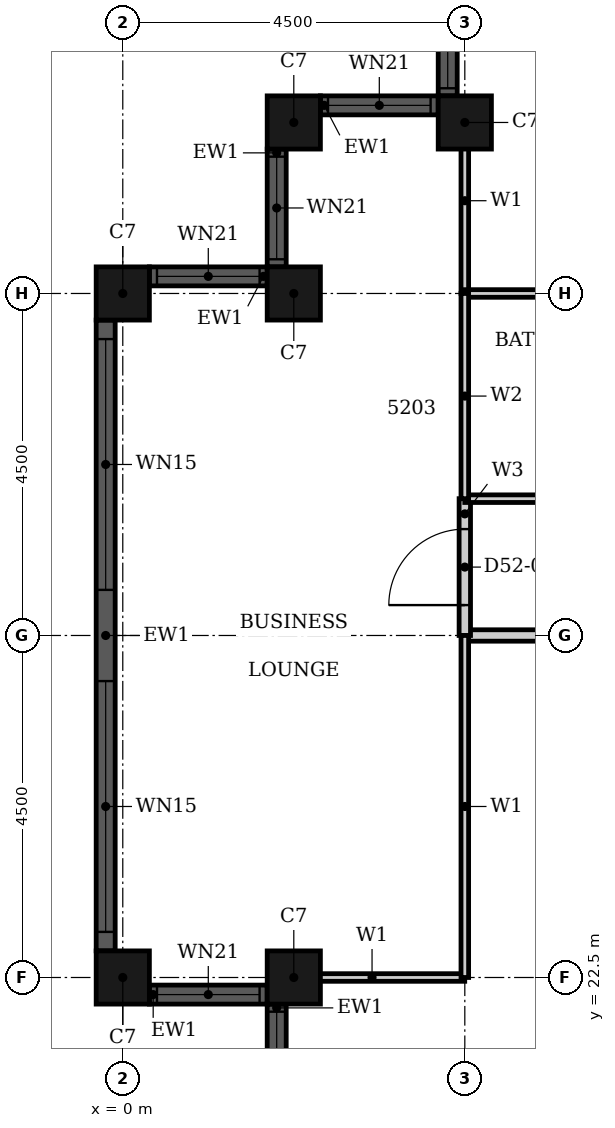
"""IFC4 building model, lengths in metres.
Left out: names, types, materials, properties, quantities, classifications, styles, units other than length and angle.
Written with IfcOpenShell. Run it as: python <this file> out.ifc"""

import sys

from ifc_helpers import new_model, si_unit, direction, frame, frame_2d, origin, origin_2d, place, context, subcontext, project, spatial, rectangle, hollow_rectangle, extrude, element, fill, save


model = new_model("IFC4")
c1 = context("Model", 3, precision=1e-05, world=origin(), true_north=direction((0.0, 1.0)))
c2 = subcontext(c1, "Body", "Model", "MODEL_VIEW")
j1 = project(units=[si_unit("LENGTHUNIT", "METRE"), si_unit("PLANEANGLEUNIT", "RADIAN")], contexts=[c1])
p1 = place(None, origin())
s1 = spatial("IfcSite", under=j1, at=p1, CompositionType="ELEMENT")
p2 = place(p1, origin())
s2 = spatial("IfcBuilding", under=s1, at=p2, CompositionType="ELEMENT")
p3 = place(p2, frame((0.0, 0.0, 207.2)))
s3 = spatial("IfcBuildingStorey", under=s2, at=p3, CompositionType="ELEMENT", Elevation=207.2)
for number, where, z_axis, x_axis in (
    (1, (4.5, 33.75, 0.0), (0.0, 0.0, 1.0), (1.0, 0.0, 0.0)),
    (2, (2.25, 33.75, 0.0), (0.0, 0.0, 1.0), (1.0, 0.0, 0.0)),
    (3, (2.25, 31.5, 0.0), (0.0, 0.0, 1.0), (1.0, 0.0, 0.0)),
    (4, (0.0, 31.5, 0.0), (0.0, 0.0, 1.0), (1.0, 0.0, 0.0)),
    (5, (0.0, 22.5, 0.0), (0.0, 0.0, 1.0), (1.0, 0.0, 0.0)),
    (6, (2.25, 22.5, 0.0), (0.0, 0.0, 1.0), (1.0, 0.0, 0.0)),
):
    element("IfcColumn", number, at=place(p3, frame(where, z_axis=z_axis, x_axis=x_axis)), inside=s3, PredefinedType="COLUMN", context=c2, shape_type="SweptSolid", body=[
        extrude(hollow_rectangle(XDim=0.7, YDim=0.7, WallThickness=0.022, at=origin_2d()), origin(), (0.0, 0.0, 1.0), 3.7),
    ])
p4 = place(p3, frame((4.275, 35.65, 0.0), z_axis=(0.0, 0.0, 1.0), x_axis=(0.0, -1.0, 0.0)))
e7 = element("IfcWall", 7, at=p4, inside=s3, PredefinedType="SOLIDWALL", context=c2, shape_type="SweptSolid", body=[
    extrude(rectangle(XDim=1.55, YDim=0.25, at=frame_2d((0.775, 0.0))), origin(), (0.0, 0.0, 1.0), 3.7),
])
p5 = place(p4, frame((0.1, 0.0, 0.9)))
e8 = element("IfcOpeningElement", 8, at=p5, cuts=e7, PredefinedType="OPENING", context=c2, shape_type="SweptSolid", body=[
    extrude(rectangle(XDim=1.35, YDim=1.85, at=frame_2d((0.675, 0.925))), frame((0.0, 0.135, 0.0), z_axis=(0.0, -1.0, 0.0), x_axis=(1.0, 0.0, 0.0)), (0.0, 0.0, 1.0), 0.27),
])
p6 = place(p3, frame((4.15, 33.975, 0.0), z_axis=(0.0, 0.0, 1.0), x_axis=(-1.0, 0.0, 0.0)))
e9 = element("IfcWall", 9, at=p6, inside=s3, PredefinedType="SOLIDWALL", context=c2, shape_type="SweptSolid", body=[
    extrude(rectangle(XDim=1.55, YDim=0.25, at=frame_2d((0.775, 0.0))), origin(), (0.0, 0.0, 1.0), 3.7),
])
p7 = place(p6, frame((0.1, 0.0, 0.9)))
e10 = element("IfcOpeningElement", 10, at=p7, cuts=e9, PredefinedType="OPENING", context=c2, shape_type="SweptSolid", body=[
    extrude(rectangle(XDim=1.35, YDim=1.85, at=frame_2d((0.675, 0.925))), frame((0.0, 0.135, 0.0), z_axis=(0.0, -1.0, 0.0), x_axis=(1.0, 0.0, 0.0)), (0.0, 0.0, 1.0), 0.27),
])
p8 = place(p3, frame((2.025, 33.4, 0.0), z_axis=(0.0, 0.0, 1.0), x_axis=(0.0, -1.0, 0.0)))
e11 = element("IfcWall", 11, at=p8, inside=s3, PredefinedType="SOLIDWALL", context=c2, shape_type="SweptSolid", body=[
    extrude(rectangle(XDim=1.55, YDim=0.25, at=frame_2d((0.775, 0.0))), origin(), (0.0, 0.0, 1.0), 3.7),
])
p9 = place(p8, frame((0.1, 0.0, 0.9)))
e12 = element("IfcOpeningElement", 12, at=p9, cuts=e11, PredefinedType="OPENING", context=c2, shape_type="SweptSolid", body=[
    extrude(rectangle(XDim=1.35, YDim=1.85, at=frame_2d((0.675, 0.925))), frame((0.0, 0.135, 0.0), z_axis=(0.0, -1.0, 0.0), x_axis=(1.0, 0.0, 0.0)), (0.0, 0.0, 1.0), 0.27),
])
p10 = place(p3, frame((1.9, 31.725, 0.0), z_axis=(0.0, 0.0, 1.0), x_axis=(-1.0, 0.0, 0.0)))
e13 = element("IfcWall", 13, at=p10, inside=s3, PredefinedType="SOLIDWALL", context=c2, shape_type="SweptSolid", body=[
    extrude(rectangle(XDim=1.55, YDim=0.25, at=frame_2d((0.775, 0.0))), origin(), (0.0, 0.0, 1.0), 3.7),
])
p11 = place(p10, frame((0.1, 0.0, 0.9)))
e14 = element("IfcOpeningElement", 14, at=p11, cuts=e13, PredefinedType="OPENING", context=c2, shape_type="SweptSolid", body=[
    extrude(rectangle(XDim=1.35, YDim=1.85, at=frame_2d((0.675, 0.925))), frame((0.0, 0.135, 0.0), z_axis=(0.0, -1.0, 0.0), x_axis=(1.0, 0.0, 0.0)), (0.0, 0.0, 1.0), 0.27),
])
p12 = place(p3, frame((-0.225, 31.15, 0.0), z_axis=(0.0, 0.0, 1.0), x_axis=(0.0, -1.0, 0.0)))
e15 = element("IfcWall", 15, at=p12, inside=s3, PredefinedType="SOLIDWALL", context=c2, shape_type="SweptSolid", body=[
    extrude(rectangle(XDim=8.3, YDim=0.25, at=frame_2d((4.15, 0.0))), origin(), (0.0, 0.0, 1.0), 3.7),
])
p13 = place(p12, frame((0.25, 0.0, 0.45)))
e16 = element("IfcOpeningElement", 16, at=p13, cuts=e15, PredefinedType="OPENING", context=c2, shape_type="SweptSolid", body=[
    extrude(rectangle(XDim=3.3, YDim=2.3, at=frame_2d((1.65, 1.15))), frame((0.0, 0.135, 0.0), z_axis=(0.0, -1.0, 0.0), x_axis=(1.0, 0.0, 0.0)), (0.0, 0.0, 1.0), 0.27),
])
p14 = place(p12, frame((4.75, 0.0, 0.45)))
e17 = element("IfcOpeningElement", 17, at=p14, cuts=e15, PredefinedType="OPENING", context=c2, shape_type="SweptSolid", body=[
    extrude(rectangle(XDim=3.3, YDim=2.3, at=frame_2d((1.65, 1.15))), frame((0.0, 0.135, 0.0), z_axis=(0.0, -1.0, 0.0), x_axis=(1.0, 0.0, 0.0)), (0.0, 0.0, 1.0), 0.27),
])
p15 = place(p3, frame((0.35, 22.275, 0.0), z_axis=(0.0, 0.0, 1.0), x_axis=(1.0, 0.0, 0.0)))
e18 = element("IfcWall", 18, at=p15, inside=s3, PredefinedType="SOLIDWALL", context=c2, shape_type="SweptSolid", body=[
    extrude(rectangle(XDim=1.55, YDim=0.25, at=frame_2d((0.775, 0.0))), origin(), (0.0, 0.0, 1.0), 3.7),
])
p16 = place(p15, frame((0.1, 0.0, 0.9)))
e19 = element("IfcOpeningElement", 19, at=p16, cuts=e18, PredefinedType="OPENING", context=c2, shape_type="SweptSolid", body=[
    extrude(rectangle(XDim=1.35, YDim=1.85, at=frame_2d((0.675, 0.925))), frame((0.0, 0.135, 0.0), z_axis=(0.0, -1.0, 0.0), x_axis=(1.0, 0.0, 0.0)), (0.0, 0.0, 1.0), 0.27),
])
p17 = place(p3, frame((2.025, 22.15, 0.0), z_axis=(0.0, 0.0, 1.0), x_axis=(0.0, -1.0, 0.0)))
e20 = element("IfcWall", 20, at=p17, inside=s3, PredefinedType="SOLIDWALL", context=c2, shape_type="SweptSolid", body=[
    extrude(rectangle(XDim=1.55, YDim=0.25, at=frame_2d((0.775, 0.0))), origin(), (0.0, 0.0, 1.0), 3.7),
])
p18 = place(p17, frame((0.1, 0.0, 0.9)))
e21 = element("IfcOpeningElement", 21, at=p18, cuts=e20, PredefinedType="OPENING", context=c2, shape_type="SweptSolid", body=[
    extrude(rectangle(XDim=1.35, YDim=1.85, at=frame_2d((0.675, 0.925))), frame((0.0, 0.135, 0.0), z_axis=(0.0, -1.0, 0.0), x_axis=(1.0, 0.0, 0.0)), (0.0, 0.0, 1.0), 0.27),
])
p19 = place(p3, frame((4.5, 27.0, 0.0), z_axis=(0.0, 0.0, 1.0), x_axis=(1.0, 0.0, 0.0)))
e22 = element("IfcWall", 22, at=p19, inside=s3, PredefinedType="PARTITIONING", context=c2, shape_type="SweptSolid", body=[
    extrude(rectangle(XDim=13.5, YDim=0.15, at=frame_2d((6.75, 0.0))), origin(), (0.0, 0.0, 1.0), 2.68),
])
p20 = place(p19, frame((5.35, 0.0, 0.0)))
e23 = element("IfcOpeningElement", 23, at=p20, cuts=e22, PredefinedType="OPENING", context=c2, shape_type="SweptSolid", body=[
    extrude(rectangle(XDim=1.0, YDim=2.1, at=frame_2d((0.5, 1.05))), frame((0.0, 0.085, 0.0), z_axis=(0.0, -1.0, 0.0), x_axis=(1.0, 0.0, 0.0)), (0.0, 0.0, 1.0), 0.17),
])
p21 = place(p3, frame((4.5, 27.0, 0.0), z_axis=(0.0, 0.0, 1.0), x_axis=(0.0, 1.0, 0.0)))
e24 = element("IfcWall", 24, at=p21, inside=s3, PredefinedType="PARTITIONING", context=c2, shape_type="SweptSolid", body=[
    extrude(rectangle(XDim=1.8, YDim=0.15, at=frame_2d((0.9, 0.0))), origin(), (0.0, 0.0, 1.0), 3.4),
])
p22 = place(p21, frame((0.4, 0.0, 0.0)))
e25 = element("IfcOpeningElement", 25, at=p22, cuts=e24, PredefinedType="OPENING", context=c2, shape_type="SweptSolid", body=[
    extrude(rectangle(XDim=1.0, YDim=2.1, at=frame_2d((0.5, 1.05))), frame((0.0, 0.085, 0.0), z_axis=(0.0, -1.0, 0.0), x_axis=(1.0, 0.0, 0.0)), (0.0, 0.0, 1.0), 0.17),
])
p23 = place(p3, frame((2.06, 22.5, 0.0), z_axis=(0.0, 0.0, 1.0), x_axis=(1.0, 0.0, 0.0)))
e26 = element("IfcWall", 26, at=p23, inside=s3, PredefinedType="PARTITIONING", context=c2, shape_type="SweptSolid", body=[
    extrude(rectangle(XDim=2.439, YDim=0.1, at=frame_2d((1.219, 0.0))), origin(), (0.0, 0.0, 1.0), 2.68),
])
p24 = place(p3, frame((4.5, 31.501, 0.0), z_axis=(0.0, 0.0, 1.0), x_axis=(0.0, 1.0, 0.0)))
e27 = element("IfcWall", 27, at=p24, inside=s3, PredefinedType="PARTITIONING", context=c2, shape_type="SweptSolid", body=[
    extrude(rectangle(XDim=2.439, YDim=0.1, at=frame_2d((1.219, 0.0))), origin(), (0.0, 0.0, 1.0), 3.4),
])
p25 = place(p3, frame((4.5, 22.5, 0.0), z_axis=(0.0, 0.0, 1.0), x_axis=(0.0, 1.0, 0.0)))
e28 = element("IfcWall", 28, at=p25, inside=s3, PredefinedType="PARTITIONING", context=c2, shape_type="SweptSolid", body=[
    extrude(rectangle(XDim=4.5, YDim=0.1, at=frame_2d((2.25, 0.0))), origin(), (0.0, 0.0, 1.0), 3.4),
])
p26 = place(p3, frame((4.5, 28.8, 0.0), z_axis=(0.0, 0.0, 1.0), x_axis=(1.0, 0.0, 0.0)))
e29 = element("IfcWall", 29, at=p26, inside=s3, PredefinedType="PARTITIONING", context=c2, shape_type="SweptSolid", body=[
    extrude(rectangle(XDim=2.4, YDim=0.1, at=frame_2d((1.2, 0.0))), origin(), (0.0, 0.0, 1.0), 3.4),
])
p27 = place(p3, frame((4.5, 31.5, 0.0), z_axis=(0.0, 0.0, 1.0), x_axis=(1.0, 0.0, 0.0)))
e30 = element("IfcWall", 30, at=p27, inside=s3, PredefinedType="PARTITIONING", context=c2, shape_type="SweptSolid", body=[
    extrude(rectangle(XDim=2.4, YDim=0.1, at=frame_2d((1.2, 0.0))), origin(), (0.0, 0.0, 1.0), 2.68),
])
p28 = place(p3, frame((4.5, 28.8, 0.0), z_axis=(0.0, 0.0, 1.0), x_axis=(0.0, 1.0, 0.0)))
e31 = element("IfcWall", 31, at=p28, inside=s3, PredefinedType="PARTITIONING", context=c2, shape_type="SweptSolid", body=[
    extrude(rectangle(XDim=2.7, YDim=0.1, at=frame_2d((1.35, 0.0))), origin(), (0.0, 0.0, 1.0), 3.4),
])
p29 = place(p5, origin())
e32 = element("IfcWindow", 32, at=p29, inside=s3, PartitioningType="SINGLE_PANEL", PredefinedType="WINDOW", context=c2, shape_type="SweptSolid", body=[
    extrude(rectangle(XDim=1.35, YDim=1.85, at=frame_2d((0.675, 0.925))), frame((0.0, 0.03, 0.0), z_axis=(0.0, -1.0, 0.0), x_axis=(1.0, 0.0, 0.0)), (0.0, 0.0, 1.0), 0.06),
])
fill(e8, e32)
p30 = place(p7, origin())
e33 = element("IfcWindow", 33, at=p30, inside=s3, PartitioningType="SINGLE_PANEL", PredefinedType="WINDOW", context=c2, shape_type="SweptSolid", body=[
    extrude(rectangle(XDim=1.35, YDim=1.85, at=frame_2d((0.675, 0.925))), frame((0.0, 0.03, 0.0), z_axis=(0.0, -1.0, 0.0), x_axis=(1.0, 0.0, 0.0)), (0.0, 0.0, 1.0), 0.06),
])
fill(e10, e33)
p31 = place(p9, origin())
e34 = element("IfcWindow", 34, at=p31, inside=s3, PartitioningType="SINGLE_PANEL", PredefinedType="WINDOW", context=c2, shape_type="SweptSolid", body=[
    extrude(rectangle(XDim=1.35, YDim=1.85, at=frame_2d((0.675, 0.925))), frame((0.0, 0.03, 0.0), z_axis=(0.0, -1.0, 0.0), x_axis=(1.0, 0.0, 0.0)), (0.0, 0.0, 1.0), 0.06),
])
fill(e12, e34)
p32 = place(p11, origin())
e35 = element("IfcWindow", 35, at=p32, inside=s3, PartitioningType="SINGLE_PANEL", PredefinedType="WINDOW", context=c2, shape_type="SweptSolid", body=[
    extrude(rectangle(XDim=1.35, YDim=1.85, at=frame_2d((0.675, 0.925))), frame((0.0, 0.03, 0.0), z_axis=(0.0, -1.0, 0.0), x_axis=(1.0, 0.0, 0.0)), (0.0, 0.0, 1.0), 0.06),
])
fill(e14, e35)
p33 = place(p13, origin())
e36 = element("IfcWindow", 36, at=p33, inside=s3, PartitioningType="SINGLE_PANEL", PredefinedType="WINDOW", context=c2, shape_type="SweptSolid", body=[
    extrude(rectangle(XDim=3.3, YDim=2.3, at=frame_2d((1.65, 1.15))), frame((0.0, 0.03, 0.0), z_axis=(0.0, -1.0, 0.0), x_axis=(1.0, 0.0, 0.0)), (0.0, 0.0, 1.0), 0.06),
])
fill(e16, e36)
p34 = place(p14, origin())
e37 = element("IfcWindow", 37, at=p34, inside=s3, PartitioningType="SINGLE_PANEL", PredefinedType="WINDOW", context=c2, shape_type="SweptSolid", body=[
    extrude(rectangle(XDim=3.3, YDim=2.3, at=frame_2d((1.65, 1.15))), frame((0.0, 0.03, 0.0), z_axis=(0.0, -1.0, 0.0), x_axis=(1.0, 0.0, 0.0)), (0.0, 0.0, 1.0), 0.06),
])
fill(e17, e37)
p35 = place(p16, origin())
e38 = element("IfcWindow", 38, at=p35, inside=s3, PartitioningType="SINGLE_PANEL", PredefinedType="WINDOW", context=c2, shape_type="SweptSolid", body=[
    extrude(rectangle(XDim=1.35, YDim=1.85, at=frame_2d((0.675, 0.925))), frame((0.0, 0.03, 0.0), z_axis=(0.0, -1.0, 0.0), x_axis=(1.0, 0.0, 0.0)), (0.0, 0.0, 1.0), 0.06),
])
fill(e19, e38)
p36 = place(p18, origin())
e39 = element("IfcWindow", 39, at=p36, inside=s3, PartitioningType="SINGLE_PANEL", PredefinedType="WINDOW", context=c2, shape_type="SweptSolid", body=[
    extrude(rectangle(XDim=1.35, YDim=1.85, at=frame_2d((0.675, 0.925))), frame((0.0, 0.03, 0.0), z_axis=(0.0, -1.0, 0.0), x_axis=(1.0, 0.0, 0.0)), (0.0, 0.0, 1.0), 0.06),
])
fill(e21, e39)
p37 = place(p22, origin())
e40 = element("IfcDoor", 40, at=p37, inside=s3, OperationType="SINGLE_SWING_RIGHT", PredefinedType="DOOR", context=c2, shape_type="SweptSolid", body=[
    extrude(rectangle(XDim=1.0, YDim=2.1, at=frame_2d((0.5, 1.05))), frame((0.0, 0.025, 0.0), z_axis=(0.0, -1.0, 0.0), x_axis=(1.0, 0.0, 0.0)), (0.0, 0.0, 1.0), 0.05),
])
fill(e25, e40)
save(model, sys.argv[1])
